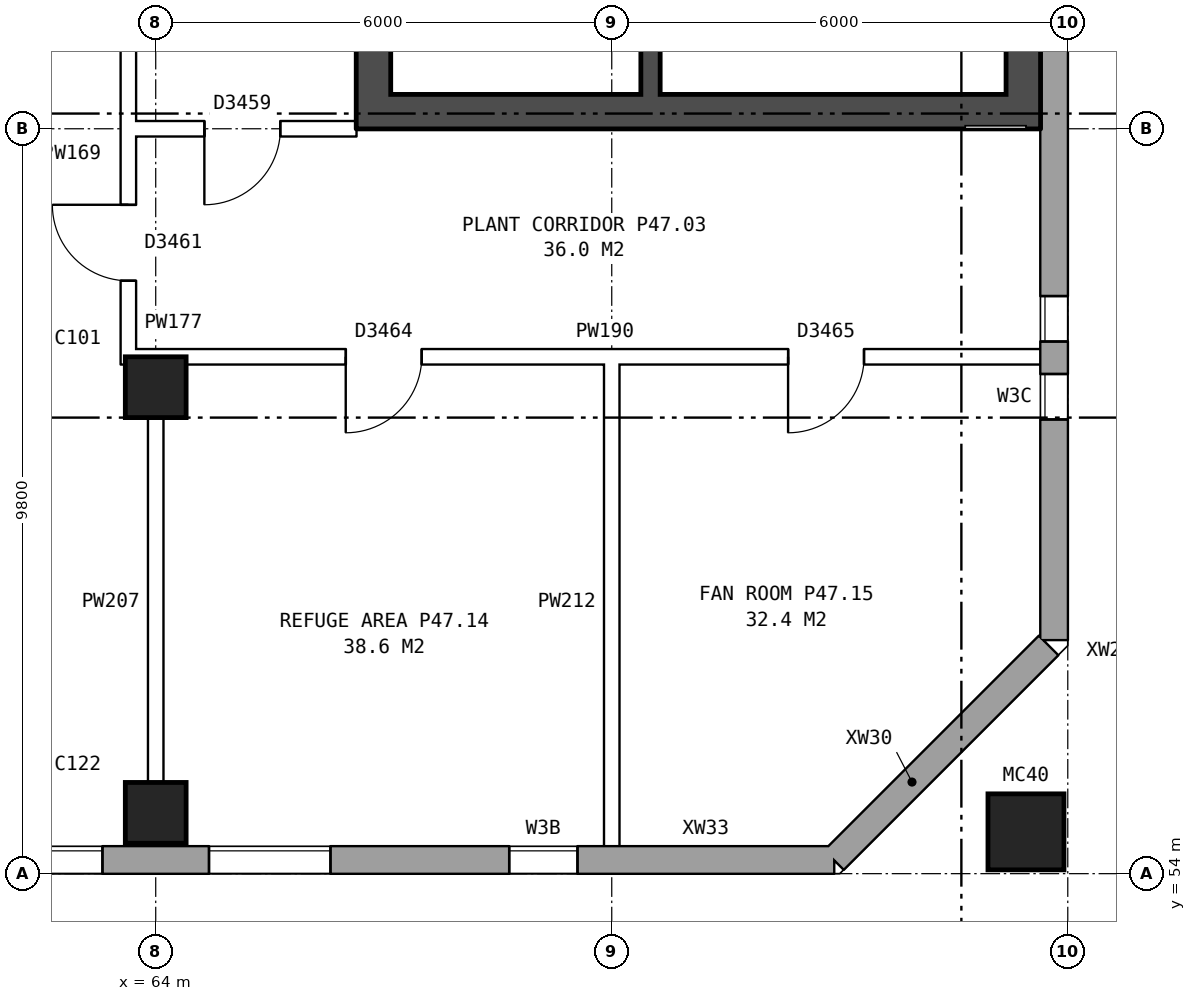
"""IFC4 building model, lengths in metres.
Left out: names, types, materials, properties, quantities, classifications, styles, units other than length and angle.
Written with IfcOpenShell. Run it as: python <this file> out.ifc"""

import sys

from ifc_helpers import new_model, si_unit, direction, frame, frame_2d, origin, origin_2d, place, context, subcontext, project, spatial, rectangle, hollow_rectangle, extrude, element, fill, save


model = new_model("IFC4")
c1 = context("Model", 3, precision=1e-05, world=origin(), true_north=direction((0.0, 1.0)))
c2 = subcontext(c1, "Body", "Model", "MODEL_VIEW")
j1 = project(units=[si_unit("LENGTHUNIT", "METRE"), si_unit("PLANEANGLEUNIT", "RADIAN")], contexts=[c1])
p1 = place(None, origin())
s1 = spatial("IfcSite", under=j1, at=p1, CompositionType="ELEMENT")
p2 = place(p1, origin())
s2 = spatial("IfcBuilding", under=s1, at=p2, CompositionType="ELEMENT")
p3 = place(p2, frame((0.0, 0.0, 167.1)))
s3 = spatial("IfcBuildingStorey", under=s2, at=p3, CompositionType="ELEMENT", Elevation=167.1)
for number, where, z_axis, x_axis in (
    (1, (64.0, 54.8, 0.0), (0.0, 0.0, 1.0), (1.0, 0.0, 0.0)),
    (2, (64.0, 60.4, 0.0), (0.0, 0.0, 1.0), (1.0, 0.0, 0.0)),
):
    element("IfcColumn", number, at=place(p3, frame(where, z_axis=z_axis, x_axis=x_axis)), inside=s3, PredefinedType="COLUMN", context=c2, shape_type="SweptSolid", body=[
        extrude(rectangle(XDim=0.8, YDim=0.8, at=origin_2d()), origin(), (0.0, 0.0, 1.0), 4.2),
    ])
p4 = place(p3, frame((75.45, 54.55, 0.0), z_axis=(0.0, 0.0, 1.0), x_axis=(1.0, 0.0, 0.0)))
e3 = element("IfcColumn", 3, at=p4, inside=s3, PredefinedType="COLUMN", context=c2, shape_type="SweptSolid", body=[
    extrude(hollow_rectangle(XDim=1.0, YDim=1.0, WallThickness=0.055, at=origin_2d()), origin(), (0.0, 0.0, 1.0), 4.5),
])
p5 = place(p3, frame((33.325, 54.18, 0.0), z_axis=(0.0, 0.0, 1.0), x_axis=(1.0, 0.0, 0.0)))
e4 = element("IfcWall", 4, at=p5, inside=s3, PredefinedType="STANDARD", context=c2, shape_type="SweptSolid", body=[
    extrude(rectangle(XDim=39.601, YDim=0.36, at=frame_2d((19.8, 0.0))), origin(), (0.0, 0.0, 1.0), 4.2),
])
p6 = place(p5, frame((0.5, 0.0, 1.5)))
e5 = element("IfcOpeningElement", 5, at=p6, cuts=e4, PredefinedType="OPENING", context=c2, shape_type="SweptSolid", body=[
    extrude(rectangle(XDim=1.6, YDim=1.2, at=frame_2d((0.8, 0.6))), frame((0.0, 0.19, 0.0), z_axis=(0.0, -1.0, 0.0), x_axis=(1.0, 0.0, 0.0)), (0.0, 0.0, 1.0), 0.38),
])
p7 = place(p5, frame((5.125, 0.0, 1.5)))
e6 = element("IfcOpeningElement", 6, at=p7, cuts=e4, PredefinedType="OPENING", context=c2, shape_type="SweptSolid", body=[
    extrude(rectangle(XDim=1.6, YDim=1.2, at=frame_2d((0.8, 0.6))), frame((0.0, 0.19, 0.0), z_axis=(0.0, -1.0, 0.0), x_axis=(1.0, 0.0, 0.0)), (0.0, 0.0, 1.0), 0.38),
])
p8 = place(p5, frame((7.375, 0.0, 1.5)))
e7 = element("IfcOpeningElement", 7, at=p8, cuts=e4, PredefinedType="OPENING", context=c2, shape_type="SweptSolid", body=[
    extrude(rectangle(XDim=1.6, YDim=1.2, at=frame_2d((0.8, 0.6))), frame((0.0, 0.19, 0.0), z_axis=(0.0, -1.0, 0.0), x_axis=(1.0, 0.0, 0.0)), (0.0, 0.0, 1.0), 0.38),
])
p9 = place(p5, frame((12.125, 0.0, 1.5)))
e8 = element("IfcOpeningElement", 8, at=p9, cuts=e4, PredefinedType="OPENING", context=c2, shape_type="SweptSolid", body=[
    extrude(rectangle(XDim=1.6, YDim=1.2, at=frame_2d((0.8, 0.6))), frame((0.0, 0.19, 0.0), z_axis=(0.0, -1.0, 0.0), x_axis=(1.0, 0.0, 0.0)), (0.0, 0.0, 1.0), 0.38),
])
p10 = place(p5, frame((18.275, 0.0, 1.5)))
e9 = element("IfcOpeningElement", 9, at=p10, cuts=e4, PredefinedType="OPENING", context=c2, shape_type="SweptSolid", body=[
    extrude(rectangle(XDim=0.6, YDim=1.2, at=frame_2d((0.3, 0.6))), frame((0.0, 0.19, 0.0), z_axis=(0.0, -1.0, 0.0), x_axis=(1.0, 0.0, 0.0)), (0.0, 0.0, 1.0), 0.38),
])
p11 = place(p5, frame((16.375, 0.0, 1.5)))
e10 = element("IfcOpeningElement", 10, at=p11, cuts=e4, PredefinedType="OPENING", context=c2, shape_type="SweptSolid", body=[
    extrude(rectangle(XDim=1.6, YDim=1.2, at=frame_2d((0.8, 0.6))), frame((0.0, 0.19, 0.0), z_axis=(0.0, -1.0, 0.0), x_axis=(1.0, 0.0, 0.0)), (0.0, 0.0, 1.0), 0.38),
])
p12 = place(p5, frame((19.375, 0.0, 1.5)))
e11 = element("IfcOpeningElement", 11, at=p12, cuts=e4, PredefinedType="OPENING", context=c2, shape_type="SweptSolid", body=[
    extrude(rectangle(XDim=1.6, YDim=1.2, at=frame_2d((0.8, 0.6))), frame((0.0, 0.19, 0.0), z_axis=(0.0, -1.0, 0.0), x_axis=(1.0, 0.0, 0.0)), (0.0, 0.0, 1.0), 0.38),
])
p13 = place(p5, frame((23.725, 0.0, 1.5)))
e12 = element("IfcOpeningElement", 12, at=p13, cuts=e4, PredefinedType="OPENING", context=c2, shape_type="SweptSolid", body=[
    extrude(rectangle(XDim=1.6, YDim=1.2, at=frame_2d((0.8, 0.6))), frame((0.0, 0.19, 0.0), z_axis=(0.0, -1.0, 0.0), x_axis=(1.0, 0.0, 0.0)), (0.0, 0.0, 1.0), 0.38),
])
p14 = place(p5, frame((28.375, 0.0, 1.5)))
e13 = element("IfcOpeningElement", 13, at=p14, cuts=e4, PredefinedType="OPENING", context=c2, shape_type="SweptSolid", body=[
    extrude(rectangle(XDim=1.6, YDim=1.2, at=frame_2d((0.8, 0.6))), frame((0.0, 0.19, 0.0), z_axis=(0.0, -1.0, 0.0), x_axis=(1.0, 0.0, 0.0)), (0.0, 0.0, 1.0), 0.38),
])
p15 = place(p5, frame((31.375, 0.0, 1.5)))
e14 = element("IfcOpeningElement", 14, at=p15, cuts=e4, PredefinedType="OPENING", context=c2, shape_type="SweptSolid", body=[
    extrude(rectangle(XDim=1.6, YDim=1.2, at=frame_2d((0.8, 0.6))), frame((0.0, 0.19, 0.0), z_axis=(0.0, -1.0, 0.0), x_axis=(1.0, 0.0, 0.0)), (0.0, 0.0, 1.0), 0.38),
])
p16 = place(p5, frame((35.325, 0.0, 1.5)))
e15 = element("IfcOpeningElement", 15, at=p16, cuts=e4, PredefinedType="OPENING", context=c2, shape_type="SweptSolid", body=[
    extrude(rectangle(XDim=0.9, YDim=1.2, at=frame_2d((0.45, 0.6))), frame((0.0, 0.19, 0.0), z_axis=(0.0, -1.0, 0.0), x_axis=(1.0, 0.0, 0.0)), (0.0, 0.0, 1.0), 0.38),
])
p17 = place(p3, frame((72.925, 54.18, 0.0), z_axis=(0.0, 0.0, 1.0), x_axis=(0.707148882153, 0.707064677713, 0.0)))
e16 = element("IfcWall", 16, at=p17, inside=s3, PredefinedType="STANDARD", context=c2, shape_type="SweptSolid", body=[
    extrude(rectangle(XDim=2.899, YDim=0.36, at=frame_2d((1.45, 0.0))), origin(), (0.0, 0.0, 1.0), 4.2),
])
p18 = place(p3, frame((74.976, 56.23, 0.953), z_axis=(0.0, 0.0, 1.0), x_axis=(0.706994764273, 0.707218780358, 0.0)))
e17 = element("IfcWall", 17, at=p18, inside=s3, PredefinedType="STANDARD", context=c2, shape_type="SweptSolid", body=[
    extrude(rectangle(XDim=1.09, YDim=0.36, at=frame_2d((0.545, 0.0))), origin(), (0.0, 0.0, 1.0), 2.444),
])
p19 = place(p3, frame((75.82, 57.075, 0.0), z_axis=(0.0, 0.0, 1.0), x_axis=(0.0, 1.0, 0.0)))
e18 = element("IfcWall", 18, at=p19, inside=s3, PredefinedType="STANDARD", context=c2, shape_type="SweptSolid", body=[
    extrude(rectangle(XDim=25.851, YDim=0.36, at=frame_2d((12.925, 0.0))), origin(), (0.0, 0.0, 1.0), 4.2),
])
p20 = place(p19, frame((2.9, 0.0, 1.5)))
e19 = element("IfcOpeningElement", 19, at=p20, cuts=e18, PredefinedType="OPENING", context=c2, shape_type="SweptSolid", body=[
    extrude(rectangle(XDim=0.6, YDim=1.2, at=frame_2d((0.3, 0.6))), frame((0.0, 0.19, 0.0), z_axis=(0.0, -1.0, 0.0), x_axis=(1.0, 0.0, 0.0)), (0.0, 0.0, 1.0), 0.38),
])
p21 = place(p19, frame((3.925, 0.0, 1.5)))
e20 = element("IfcOpeningElement", 20, at=p21, cuts=e18, PredefinedType="OPENING", context=c2, shape_type="SweptSolid", body=[
    extrude(rectangle(XDim=0.6, YDim=1.2, at=frame_2d((0.3, 0.6))), frame((0.0, 0.19, 0.0), z_axis=(0.0, -1.0, 0.0), x_axis=(1.0, 0.0, 0.0)), (0.0, 0.0, 1.0), 0.38),
])
p22 = place(p19, frame((19.625, 0.0, 1.5)))
e21 = element("IfcOpeningElement", 21, at=p22, cuts=e18, PredefinedType="OPENING", context=c2, shape_type="SweptSolid", body=[
    extrude(rectangle(XDim=1.6, YDim=1.2, at=frame_2d((0.8, 0.6))), frame((0.0, 0.19, 0.0), z_axis=(0.0, -1.0, 0.0), x_axis=(1.0, 0.0, 0.0)), (0.0, 0.0, 1.0), 0.38),
])
p23 = place(p19, frame((22.325, 0.0, 1.5)))
e22 = element("IfcOpeningElement", 22, at=p23, cuts=e18, PredefinedType="OPENING", context=c2, shape_type="SweptSolid", body=[
    extrude(rectangle(XDim=0.6, YDim=1.2, at=frame_2d((0.3, 0.6))), frame((0.0, 0.19, 0.0), z_axis=(0.0, -1.0, 0.0), x_axis=(1.0, 0.0, 0.0)), (0.0, 0.0, 1.0), 0.38),
])
p24 = place(p3, frame((66.865, 63.8, 0.0), z_axis=(0.0, 0.0, 1.0), x_axis=(0.0, 1.0, 0.0)))
e23 = element("IfcWall", 23, at=p24, inside=s3, PredefinedType="SHEAR", context=c2, shape_type="SweptSolid", body=[
    extrude(rectangle(XDim=12.4, YDim=0.45, at=frame_2d((6.2, 0.0))), origin(), (0.0, 0.0, 1.0), 4.2),
])
p25 = place(p24, frame((1.325, 0.0, 0.0)))
e24 = element("IfcOpeningElement", 24, at=p25, cuts=e23, PredefinedType="OPENING", context=c2, shape_type="SweptSolid", body=[
    extrude(rectangle(XDim=1.1, YDim=2.1, at=frame_2d((0.55, 1.05))), frame((0.0, 0.235, 0.0), z_axis=(0.0, -1.0, 0.0), x_axis=(1.0, 0.0, 0.0)), (0.0, 0.0, 1.0), 0.47),
])
p26 = place(p24, frame((3.6, 0.0, 0.0)))
e25 = element("IfcOpeningElement", 25, at=p26, cuts=e23, PredefinedType="OPENING", context=c2, shape_type="SweptSolid", body=[
    extrude(rectangle(XDim=1.1, YDim=2.1, at=frame_2d((0.55, 1.05))), frame((0.0, 0.235, 0.0), z_axis=(0.0, -1.0, 0.0), x_axis=(1.0, 0.0, 0.0)), (0.0, 0.0, 1.0), 0.47),
])
p27 = place(p24, frame((5.8, 0.0, 0.0)))
e26 = element("IfcOpeningElement", 26, at=p27, cuts=e23, PredefinedType="OPENING", context=c2, shape_type="SweptSolid", body=[
    extrude(rectangle(XDim=1.1, YDim=2.1, at=frame_2d((0.55, 1.05))), frame((0.0, 0.235, 0.0), z_axis=(0.0, -1.0, 0.0), x_axis=(1.0, 0.0, 0.0)), (0.0, 0.0, 1.0), 0.47),
])
p28 = place(p24, frame((8.0, 0.0, 0.0)))
e27 = element("IfcOpeningElement", 27, at=p28, cuts=e23, PredefinedType="OPENING", context=c2, shape_type="SweptSolid", body=[
    extrude(rectangle(XDim=1.1, YDim=2.1, at=frame_2d((0.55, 1.05))), frame((0.0, 0.235, 0.0), z_axis=(0.0, -1.0, 0.0), x_axis=(1.0, 0.0, 0.0)), (0.0, 0.0, 1.0), 0.47),
])
p29 = place(p24, frame((9.9, 0.0, 0.0)))
e28 = element("IfcOpeningElement", 28, at=p29, cuts=e23, PredefinedType="OPENING", context=c2, shape_type="SweptSolid", body=[
    extrude(rectangle(XDim=1.1, YDim=2.1, at=frame_2d((0.55, 1.05))), frame((0.0, 0.235, 0.0), z_axis=(0.0, -1.0, 0.0), x_axis=(1.0, 0.0, 0.0)), (0.0, 0.0, 1.0), 0.47),
])
p30 = place(p3, frame((75.415, 63.8, 0.0), z_axis=(0.0, 0.0, 1.0), x_axis=(0.0, 1.0, 0.0)))
e29 = element("IfcWall", 29, at=p30, inside=s3, PredefinedType="SHEAR", context=c2, shape_type="SweptSolid", body=[
    extrude(rectangle(XDim=12.4, YDim=0.45, at=frame_2d((6.2, 0.0))), origin(), (0.0, 0.0, 1.0), 4.2),
])
p31 = place(p3, frame((67.09, 64.025, 0.0), z_axis=(0.0, 0.0, 1.0), x_axis=(1.0, 0.0, 0.0)))
e30 = element("IfcWall", 30, at=p31, inside=s3, PredefinedType="SHEAR", context=c2, shape_type="SweptSolid", body=[
    extrude(rectangle(XDim=8.1, YDim=0.45, at=frame_2d((4.05, 0.0))), origin(), (0.0, 0.0, 1.0), 4.2),
])
p32 = place(p3, frame((70.51, 64.25, 0.0), z_axis=(0.0, 0.0, 1.0), x_axis=(0.0, 1.0, 0.0)))
e31 = element("IfcWall", 31, at=p32, inside=s3, PredefinedType="SHEAR", context=c2, shape_type="SweptSolid", body=[
    extrude(rectangle(XDim=2.475, YDim=0.25, at=frame_2d((1.238, 0.0))), origin(), (0.0, 0.0, 1.0), 4.2),
])
p33 = place(p3, frame((63.64, 63.9, 0.0), z_axis=(0.0, 0.0, 1.0), x_axis=(0.0, 1.0, 0.0)))
e32 = element("IfcWall", 32, at=p33, inside=s3, PredefinedType="PARTITIONING", context=c2, shape_type="SweptSolid", body=[
    extrude(rectangle(XDim=12.2, YDim=0.2, at=frame_2d((6.1, 0.0))), origin(), (0.0, 0.0, 1.0), 4.2),
])
p34 = place(p33, frame((5.1, 0.0, 0.0)))
e33 = element("IfcOpeningElement", 33, at=p34, cuts=e32, PredefinedType="OPENING", context=c2, shape_type="SweptSolid", body=[
    extrude(rectangle(XDim=2.0, YDim=2.1, at=frame_2d((1.0, 1.05))), frame((0.0, 0.11, 0.0), z_axis=(0.0, -1.0, 0.0), x_axis=(1.0, 0.0, 0.0)), (0.0, 0.0, 1.0), 0.22),
])
p35 = place(p3, frame((63.54, 60.8, 0.0), z_axis=(0.0, 0.0, 1.0), x_axis=(1.0, 0.0, 0.0)))
e34 = element("IfcWall", 34, at=p35, inside=s3, PredefinedType="PARTITIONING", context=c2, shape_type="SweptSolid", body=[
    extrude(rectangle(XDim=12.22, YDim=0.2, at=frame_2d((6.11, 0.0))), origin(), (0.0, 0.0, 1.0), 4.2),
])
p36 = place(p35, frame((2.96, 0.0, 0.0)))
e35 = element("IfcOpeningElement", 35, at=p36, cuts=e34, PredefinedType="OPENING", context=c2, shape_type="SweptSolid", body=[
    extrude(rectangle(XDim=1.0, YDim=2.1, at=frame_2d((0.5, 1.05))), frame((0.0, 0.11, 0.0), z_axis=(0.0, -1.0, 0.0), x_axis=(1.0, 0.0, 0.0)), (0.0, 0.0, 1.0), 0.22),
])
p37 = place(p35, frame((8.78, 0.0, 0.0)))
e36 = element("IfcOpeningElement", 36, at=p37, cuts=e34, PredefinedType="OPENING", context=c2, shape_type="SweptSolid", body=[
    extrude(rectangle(XDim=1.0, YDim=2.1, at=frame_2d((0.5, 1.05))), frame((0.0, 0.11, 0.0), z_axis=(0.0, -1.0, 0.0), x_axis=(1.0, 0.0, 0.0)), (0.0, 0.0, 1.0), 0.22),
])
p38 = place(p3, frame((63.54, 63.8, 0.0), z_axis=(0.0, 0.0, 1.0), x_axis=(1.0, 0.0, 0.0)))
e37 = element("IfcWall", 37, at=p38, inside=s3, PredefinedType="PARTITIONING", context=c2, shape_type="SweptSolid", body=[
    extrude(rectangle(XDim=3.1, YDim=0.2, at=frame_2d((1.55, 0.0))), origin(), (0.0, 0.0, 1.0), 4.2),
])
p39 = place(p38, frame((1.1, 0.0, 0.0)))
e38 = element("IfcOpeningElement", 38, at=p39, cuts=e37, PredefinedType="OPENING", context=c2, shape_type="SweptSolid", body=[
    extrude(rectangle(XDim=1.0, YDim=2.1, at=frame_2d((0.5, 1.05))), frame((0.0, 0.11, 0.0), z_axis=(0.0, -1.0, 0.0), x_axis=(1.0, 0.0, 0.0)), (0.0, 0.0, 1.0), 0.22),
])
p40 = place(p3, frame((63.64, 60.7, 0.0), z_axis=(0.0, 0.0, 1.0), x_axis=(0.0, 1.0, 0.0)))
e39 = element("IfcWall", 39, at=p40, inside=s3, PredefinedType="PARTITIONING", context=c2, shape_type="SweptSolid", body=[
    extrude(rectangle(XDim=3.2, YDim=0.2, at=frame_2d((1.6, 0.0))), origin(), (0.0, 0.0, 1.0), 4.2),
])
p41 = place(p40, frame((1.1, 0.0, 0.0)))
e40 = element("IfcOpeningElement", 40, at=p41, cuts=e39, PredefinedType="OPENING", context=c2, shape_type="SweptSolid", body=[
    extrude(rectangle(XDim=1.0, YDim=2.1, at=frame_2d((0.5, 1.05))), frame((0.0, 0.11, 0.0), z_axis=(0.0, -1.0, 0.0), x_axis=(1.0, 0.0, 0.0)), (0.0, 0.0, 1.0), 0.22),
])
for number, where, z_axis, x_axis in (
    (41, (64.0, 54.24, 0.0), (0.0, 0.0, 1.0), (0.0, 1.0, 0.0)),
    (42, (70.0, 54.24, 0.0), (0.0, 0.0, 1.0), (0.0, 1.0, 0.0)),
):
    element("IfcWall", number, at=place(p3, frame(where, z_axis=z_axis, x_axis=x_axis)), inside=s3, PredefinedType="PARTITIONING", context=c2, shape_type="SweptSolid", body=[
        extrude(rectangle(XDim=6.66, YDim=0.2, at=frame_2d((3.33, 0.0))), origin(), (0.0, 0.0, 1.0), 4.2),
    ])
p42 = place(p14, origin())
e43 = element("IfcWindow", 43, at=p42, inside=s3, PartitioningType="DOUBLE_PANEL_HORIZONTAL", PredefinedType="WINDOW", context=c2, shape_type="SweptSolid", body=[
    extrude(rectangle(XDim=1.6, YDim=1.2, at=frame_2d((0.8, 0.6))), frame((0.0, 0.15, 0.0), z_axis=(0.0, -1.0, 0.0), x_axis=(1.0, 0.0, 0.0)), (0.0, 0.0, 1.0), 0.06),
])
fill(e13, e43)
p43 = place(p15, origin())
e44 = element("IfcWindow", 44, at=p43, inside=s3, PartitioningType="DOUBLE_PANEL_HORIZONTAL", PredefinedType="WINDOW", context=c2, shape_type="SweptSolid", body=[
    extrude(rectangle(XDim=1.6, YDim=1.2, at=frame_2d((0.8, 0.6))), frame((0.0, 0.15, 0.0), z_axis=(0.0, -1.0, 0.0), x_axis=(1.0, 0.0, 0.0)), (0.0, 0.0, 1.0), 0.06),
])
fill(e14, e44)
p44 = place(p16, origin())
e45 = element("IfcWindow", 45, at=p44, inside=s3, PartitioningType="DOUBLE_PANEL_HORIZONTAL", PredefinedType="WINDOW", context=c2, shape_type="SweptSolid", body=[
    extrude(rectangle(XDim=0.9, YDim=1.2, at=frame_2d((0.45, 0.6))), frame((0.0, 0.15, 0.0), z_axis=(0.0, -1.0, 0.0), x_axis=(1.0, 0.0, 0.0)), (0.0, 0.0, 1.0), 0.06),
])
fill(e15, e45)
p45 = place(p20, origin())
e46 = element("IfcWindow", 46, at=p45, inside=s3, PartitioningType="DOUBLE_PANEL_HORIZONTAL", PredefinedType="WINDOW", context=c2, shape_type="SweptSolid", body=[
    extrude(rectangle(XDim=0.6, YDim=1.2, at=frame_2d((0.3, 0.6))), frame((0.0, 0.15, 0.0), z_axis=(0.0, -1.0, 0.0), x_axis=(1.0, 0.0, 0.0)), (0.0, 0.0, 1.0), 0.06),
])
fill(e19, e46)
p46 = place(p21, origin())
e47 = element("IfcWindow", 47, at=p46, inside=s3, PartitioningType="DOUBLE_PANEL_HORIZONTAL", PredefinedType="WINDOW", context=c2, shape_type="SweptSolid", body=[
    extrude(rectangle(XDim=0.6, YDim=1.2, at=frame_2d((0.3, 0.6))), frame((0.0, 0.15, 0.0), z_axis=(0.0, -1.0, 0.0), x_axis=(1.0, 0.0, 0.0)), (0.0, 0.0, 1.0), 0.06),
])
fill(e20, e47)
p47 = place(p36, frame((1.0, 0.0, 0.0), z_axis=(0.0, 0.0, 1.0), x_axis=(-1.0, 0.0, 0.0)))
e48 = element("IfcDoor", 48, at=p47, inside=s3, OperationType="SINGLE_SWING_RIGHT", PredefinedType="DOOR", context=c2, shape_type="SweptSolid", body=[
    extrude(rectangle(XDim=1.0, YDim=2.1, at=frame_2d((0.5, 1.05))), frame((0.0, 0.025, 0.0), z_axis=(0.0, -1.0, 0.0), x_axis=(1.0, 0.0, 0.0)), (0.0, 0.0, 1.0), 0.05),
])
fill(e35, e48)
p48 = place(p37, frame((1.0, 0.0, 0.0), z_axis=(0.0, 0.0, 1.0), x_axis=(-1.0, 0.0, 0.0)))
e49 = element("IfcDoor", 49, at=p48, inside=s3, OperationType="SINGLE_SWING_RIGHT", PredefinedType="DOOR", context=c2, shape_type="SweptSolid", body=[
    extrude(rectangle(XDim=1.0, YDim=2.1, at=frame_2d((0.5, 1.05))), frame((0.0, 0.025, 0.0), z_axis=(0.0, -1.0, 0.0), x_axis=(1.0, 0.0, 0.0)), (0.0, 0.0, 1.0), 0.05),
])
fill(e36, e49)
p49 = place(p39, frame((1.0, 0.0, 0.0), z_axis=(0.0, 0.0, 1.0), x_axis=(-1.0, 0.0, 0.0)))
e50 = element("IfcDoor", 50, at=p49, inside=s3, OperationType="SINGLE_SWING_RIGHT", PredefinedType="DOOR", context=c2, shape_type="SweptSolid", body=[
    extrude(rectangle(XDim=1.0, YDim=2.1, at=frame_2d((0.5, 1.05))), frame((0.0, 0.025, 0.0), z_axis=(0.0, -1.0, 0.0), x_axis=(1.0, 0.0, 0.0)), (0.0, 0.0, 1.0), 0.05),
])
fill(e38, e50)
p50 = place(p41, origin())
e51 = element("IfcDoor", 51, at=p50, inside=s3, OperationType="SINGLE_SWING_RIGHT", PredefinedType="DOOR", context=c2, shape_type="SweptSolid", body=[
    extrude(rectangle(XDim=1.0, YDim=2.1, at=frame_2d((0.5, 1.05))), frame((0.0, 0.025, 0.0), z_axis=(0.0, -1.0, 0.0), x_axis=(1.0, 0.0, 0.0)), (0.0, 0.0, 1.0), 0.05),
])
fill(e40, e51)
save(model, sys.argv[1])
